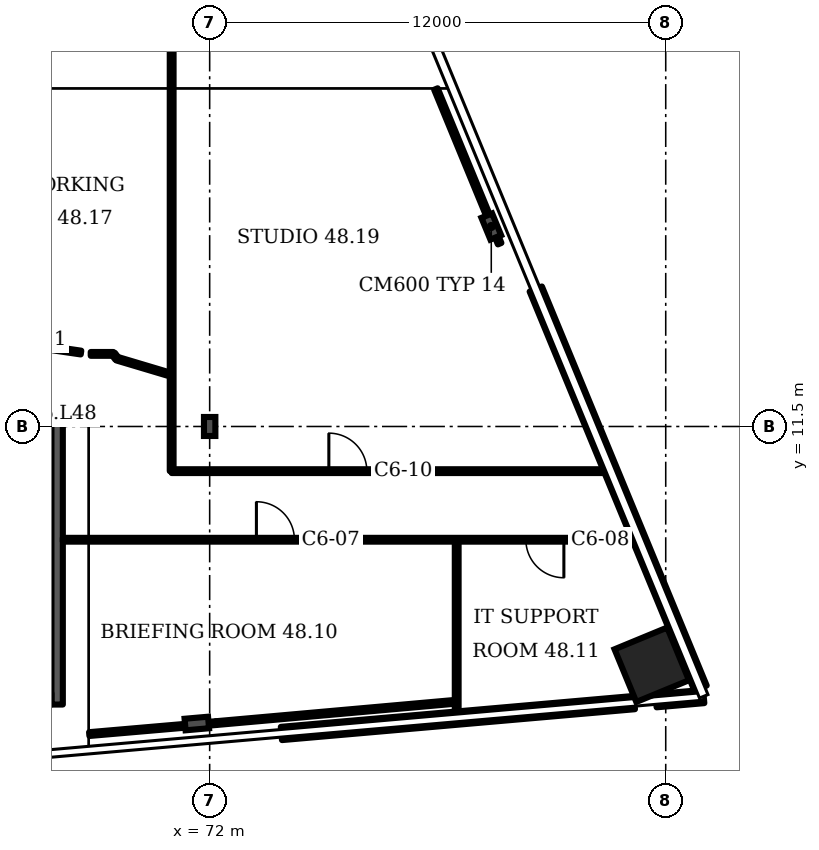
"""IFC4 building model, lengths in metres.
Left out: names, types, materials, properties, quantities, classifications, styles, units other than length and angle.
Written with IfcOpenShell. Run it as: python <this file> out.ifc"""

import sys

from ifc_helpers import new_model, si_unit, direction, frame, frame_2d, origin, origin_2d, place, context, subcontext, project, spatial, rectangle, i_section, extrude, element, fill, save


model = new_model("IFC4")
c1 = context("Model", 3, precision=1e-05, world=origin(), true_north=direction((0.0, 1.0)))
c2 = subcontext(c1, "Body", "Model", "MODEL_VIEW")
j1 = project(units=[si_unit("LENGTHUNIT", "METRE"), si_unit("PLANEANGLEUNIT", "RADIAN")], contexts=[c1])
p1 = place(None, origin())
s1 = spatial("IfcSite", under=j1, at=p1, CompositionType="ELEMENT")
p2 = place(p1, origin())
s2 = spatial("IfcBuilding", under=s1, at=p2, CompositionType="ELEMENT")
p3 = place(p2, frame((0.0, 0.0, 195.1)))
s3 = spatial("IfcBuildingStorey", under=s2, at=p3, CompositionType="ELEMENT", Elevation=195.1)
p4 = place(p3, frame((83.633, 5.231, 0.0), z_axis=(0.0, 0.0, 1.0), x_axis=(-0.381602, 0.924325, 0.0)))
e1 = element("IfcColumn", 1, at=p4, inside=s3, PredefinedType="COLUMN", context=c2, shape_type="SweptSolid", body=[
    extrude(rectangle(XDim=1.5, YDim=1.5, at=origin_2d()), origin(), (0.0, 0.0, 1.0), 3.6),
])
for number, where, z_axis, x_axis in (
    (2, (71.662, 3.685, 0.0), (0.0, 0.0, 1.0), (0.087, -0.996, 0.0)),
    (3, (79.41, 16.762, 0.0), (0.0, 0.0, 1.0), (0.924, 0.382, 0.0)),
):
    element("IfcColumn", number, at=place(p3, frame(where, z_axis=z_axis, x_axis=x_axis)), inside=s3, PredefinedType="COLUMN", context=c2, shape_type="SweptSolid", body=[
        extrude(i_section(OverallWidth=0.305, OverallDepth=0.62, WebThickness=0.021, FlangeThickness=0.04, FilletRadius=0.027, at=origin_2d()), origin(), (0.0, 0.0, 1.0), 3.6),
    ])
p5 = place(p3, frame((72.0, 11.5, 0.0), z_axis=(0.0, 0.0, 1.0), x_axis=(1.0, 0.0, 0.0)))
e4 = element("IfcColumn", 4, at=p5, inside=s3, PredefinedType="COLUMN", context=c2, shape_type="SweptSolid", body=[
    extrude(i_section(OverallWidth=0.3, OverallDepth=0.5, WebThickness=0.014, FlangeThickness=0.028, FilletRadius=0.027, at=origin_2d()), origin(), (0.0, 0.0, 1.0), 3.6),
])
p6 = place(p3, frame((73.887, 3.423, 0.0), z_axis=(0.0, 0.0, 1.0), x_axis=(0.996197, 0.087145, 0.0)))
e5 = element("IfcWall", 5, at=p6, inside=s3, PredefinedType="SOLIDWALL", context=c2, shape_type="SweptSolid", body=[
    extrude(rectangle(XDim=9.323, YDim=0.35, at=frame_2d((4.662, 0.0))), origin(), (0.0, 0.0, 1.0), 1.0),
])
p7 = place(p3, frame((83.745, 4.285, 0.0), z_axis=(0.0, 0.0, 1.0), x_axis=(0.996198, 0.087148, 0.0)))
e6 = element("IfcWall", 6, at=p7, inside=s3, PredefinedType="SOLIDWALL", context=c2, shape_type="SweptSolid", body=[
    extrude(rectangle(XDim=1.261, YDim=0.35, at=frame_2d((0.63, 0.0))), origin(), (0.0, 0.0, 1.0), 1.0),
])
p8 = place(p3, frame((84.916, 4.616, 0.0), z_axis=(0.0, 0.0, 1.0), x_axis=(-0.381598, 0.924328, 0.0)))
e7 = element("IfcWall", 7, at=p8, inside=s3, PredefinedType="SOLIDWALL", context=c2, shape_type="SweptSolid", body=[
    extrude(rectangle(XDim=11.361, YDim=0.35, at=frame_2d((5.68, 0.0))), origin(), (0.0, 0.0, 1.0), 1.0),
])
p9 = place(p3, frame((63.786, 11.834, 0.0), z_axis=(0.0, 0.0, 1.0), x_axis=(1.0, 0.0, 0.0)))
e8 = element("IfcWall", 8, at=p9, inside=s3, PredefinedType="SHEAR", context=c2, shape_type="SweptSolid", body=[
    extrude(rectangle(XDim=4.35, YDim=0.3, at=frame_2d((2.175, 0.0))), origin(), (0.0, 0.0, 1.0), 3.2),
])
p10 = place(p9, frame((1.575, 0.0, 0.0)))
e9 = element("IfcOpeningElement", 9, at=p10, cuts=e8, PredefinedType="OPENING", context=c2, shape_type="SweptSolid", body=[
    extrude(rectangle(XDim=1.2, YDim=2.1, at=frame_2d((0.6, 1.05))), frame((0.0, 0.16, 0.0), z_axis=(0.0, -1.0, 0.0), x_axis=(1.0, 0.0, 0.0)), (0.0, 0.0, 1.0), 0.32),
])
p11 = place(p3, frame((68.136, 8.52, 0.0), z_axis=(0.0, 0.0, 1.0), x_axis=(1.0, 0.0, 0.0)))
e10 = element("IfcWall", 10, at=p11, inside=s3, PredefinedType="PARTITIONING", context=c2, shape_type="SweptSolid", body=[
    extrude(rectangle(XDim=15.141, YDim=0.1, at=frame_2d((7.57, 0.0))), origin(), (0.0, 0.0, 1.0), 2.58),
])
p12 = place(p11, frame((5.094, 0.0, 0.0)))
e11 = element("IfcOpeningElement", 11, at=p12, cuts=e10, PredefinedType="OPENING", context=c2, shape_type="SweptSolid", body=[
    extrude(rectangle(XDim=1.0, YDim=2.1, at=frame_2d((0.5, 1.05))), frame((0.0, 0.06, 0.0), z_axis=(0.0, -1.0, 0.0), x_axis=(1.0, 0.0, 0.0)), (0.0, 0.0, 1.0), 0.12),
])
p13 = place(p11, frame((12.184, 0.0, 0.0)))
e12 = element("IfcOpeningElement", 12, at=p13, cuts=e10, PredefinedType="OPENING", context=c2, shape_type="SweptSolid", body=[
    extrude(rectangle(XDim=1.0, YDim=2.1, at=frame_2d((0.5, 1.05))), frame((0.0, 0.06, 0.0), z_axis=(0.0, -1.0, 0.0), x_axis=(1.0, 0.0, 0.0)), (0.0, 0.0, 1.0), 0.12),
])
p14 = place(p3, frame((68.615, 13.445, 0.0), z_axis=(0.0, 0.0, 1.0), x_axis=(-0.989463, 0.144803, 0.0)))
e13 = element("IfcWall", 13, at=p14, inside=s3, PredefinedType="PARTITIONING", context=c2, shape_type="SweptSolid", body=[
    extrude(rectangle(XDim=1.657, YDim=0.1, at=frame_2d((0.829, 0.0))), origin(), (0.0, 0.0, 1.0), 3.2),
])
p15 = place(p3, frame((68.831, 3.407, 0.0), z_axis=(0.0, 0.0, 1.0), x_axis=(0.996283, 0.086167, 0.0)))
e14 = element("IfcWall", 14, at=p15, inside=s3, PredefinedType="PARTITIONING", context=c2, shape_type="SweptSolid", body=[
    extrude(rectangle(XDim=3.346, YDim=0.1, at=frame_2d((1.673, 0.0))), origin(), (0.0, 0.0, 1.0), 2.58),
])
p16 = place(p3, frame((68.87, 13.41, 0.0), z_axis=(0.0, 0.0, 1.0), x_axis=(1.0, 0.0, 0.0)))
e15 = element("IfcWall", 15, at=p16, inside=s3, PredefinedType="PARTITIONING", context=c2, shape_type="SweptSolid", body=[
    extrude(rectangle(XDim=0.595, YDim=0.1, at=frame_2d((0.297, 0.0))), origin(), (0.0, 0.0, 1.0), 3.2),
])
p17 = place(p3, frame((69.56, 13.285, 0.0), z_axis=(0.0, 0.0, 1.0), x_axis=(-0.604968, 0.796256, 0.0)))
e16 = element("IfcWall", 16, at=p17, inside=s3, PredefinedType="PARTITIONING", context=c2, shape_type="SweptSolid", body=[
    extrude(rectangle(XDim=0.157, YDim=0.1, at=frame_2d((0.079, 0.0))), origin(), (0.0, 0.0, 1.0), 3.2),
])
p18 = place(p3, frame((70.9, 12.885, 0.0), z_axis=(0.0, 0.0, 1.0), x_axis=(-0.958229, 0.286002, 0.0)))
e17 = element("IfcWall", 17, at=p18, inside=s3, PredefinedType="PARTITIONING", context=c2, shape_type="SweptSolid", body=[
    extrude(rectangle(XDim=1.398, YDim=0.1, at=frame_2d((0.699, 0.0))), origin(), (0.0, 0.0, 1.0), 3.2),
])
p19 = place(p3, frame((71.0, 10.325, 0.0), z_axis=(0.0, 0.0, 1.0), x_axis=(0.0, 1.0, 0.0)))
e18 = element("IfcWall", 18, at=p19, inside=s3, PredefinedType="PARTITIONING", context=c2, shape_type="SweptSolid", body=[
    extrude(rectangle(XDim=11.4, YDim=0.1, at=frame_2d((5.7, 0.0))), origin(), (0.0, 0.0, 1.0), 3.2),
])
p20 = place(p3, frame((71.0, 10.325, 0.0), z_axis=(0.0, 0.0, 1.0), x_axis=(1.0, 0.0, 0.0)))
e19 = element("IfcWall", 19, at=p20, inside=s3, PredefinedType="PARTITIONING", context=c2, shape_type="SweptSolid", body=[
    extrude(rectangle(XDim=11.532, YDim=0.1, at=frame_2d((5.766, 0.0))), origin(), (0.0, 0.0, 1.0), 2.58),
])
p21 = place(p20, frame((4.136, 0.0, 0.0)))
e20 = element("IfcOpeningElement", 20, at=p21, cuts=e19, PredefinedType="OPENING", context=c2, shape_type="SweptSolid", body=[
    extrude(rectangle(XDim=1.0, YDim=2.1, at=frame_2d((0.5, 1.05))), frame((0.0, 0.06, 0.0), z_axis=(0.0, -1.0, 0.0), x_axis=(1.0, 0.0, 0.0)), (0.0, 0.0, 1.0), 0.12),
])
p22 = place(p3, frame((72.165, 3.695, 0.0), z_axis=(0.0, 0.0, 1.0), x_axis=(0.996066, 0.08865, 0.0)))
e21 = element("IfcWall", 21, at=p22, inside=s3, PredefinedType="PARTITIONING", context=c2, shape_type="SweptSolid", body=[
    extrude(rectangle(XDim=6.315, YDim=0.1, at=frame_2d((3.157, 0.0))), origin(), (0.0, 0.0, 1.0), 2.58),
])
p23 = place(p3, frame((78.5, 3.87, 0.0), z_axis=(0.0, 0.0, 1.0), x_axis=(0.0, 1.0, 0.0)))
e22 = element("IfcWall", 22, at=p23, inside=s3, PredefinedType="PARTITIONING", context=c2, shape_type="SweptSolid", body=[
    extrude(rectangle(XDim=4.65, YDim=0.1, at=frame_2d((2.325, 0.0))), origin(), (0.0, 0.0, 1.0), 2.58),
])
p24 = place(p3, frame((79.63, 16.31, 0.0), z_axis=(0.0, 0.0, 1.0), x_axis=(-0.380933, 0.9246, 0.0)))
e23 = element("IfcWall", 23, at=p24, inside=s3, PredefinedType="PARTITIONING", context=c2, shape_type="SweptSolid", body=[
    extrude(rectangle(XDim=4.402, YDim=0.1, at=frame_2d((2.201, 0.0))), origin(), (0.0, 0.0, 1.0), 2.58),
])
p25 = place(p3, frame((67.986, 4.184, 0.0), z_axis=(0.0, 0.0, 1.0), x_axis=(0.0, 1.0, 0.0)))
e24 = element("IfcWall", 24, at=p25, inside=s3, PredefinedType="SHEAR", context=c2, shape_type="SweptSolid", body=[
    extrude(rectangle(XDim=7.5, YDim=0.3, at=frame_2d((3.75, 0.0))), origin(), (0.0, 0.0, 1.0), 3.2),
])
p26 = place(p12, origin())
e25 = element("IfcDoor", 25, at=p26, inside=s3, OperationType="SINGLE_SWING_LEFT", PredefinedType="DOOR", context=c2, shape_type="SweptSolid", body=[
    extrude(rectangle(XDim=1.0, YDim=2.1, at=frame_2d((0.5, 1.05))), frame((0.0, 0.025, 0.0), z_axis=(0.0, -1.0, 0.0), x_axis=(1.0, 0.0, 0.0)), (0.0, 0.0, 1.0), 0.05),
])
fill(e11, e25)
p27 = place(p13, origin())
e26 = element("IfcDoor", 26, at=p27, inside=s3, OperationType="SINGLE_SWING_RIGHT", PredefinedType="DOOR", context=c2, shape_type="SweptSolid", body=[
    extrude(rectangle(XDim=1.0, YDim=2.1, at=frame_2d((0.5, 1.05))), frame((0.0, 0.025, 0.0), z_axis=(0.0, -1.0, 0.0), x_axis=(1.0, 0.0, 0.0)), (0.0, 0.0, 1.0), 0.05),
])
fill(e12, e26)
p28 = place(p21, origin())
e27 = element("IfcDoor", 27, at=p28, inside=s3, OperationType="SINGLE_SWING_LEFT", PredefinedType="DOOR", context=c2, shape_type="SweptSolid", body=[
    extrude(rectangle(XDim=1.0, YDim=2.1, at=frame_2d((0.5, 1.05))), frame((0.0, 0.025, 0.0), z_axis=(0.0, -1.0, 0.0), x_axis=(1.0, 0.0, 0.0)), (0.0, 0.0, 1.0), 0.05),
])
fill(e20, e27)
save(model, sys.argv[1])
